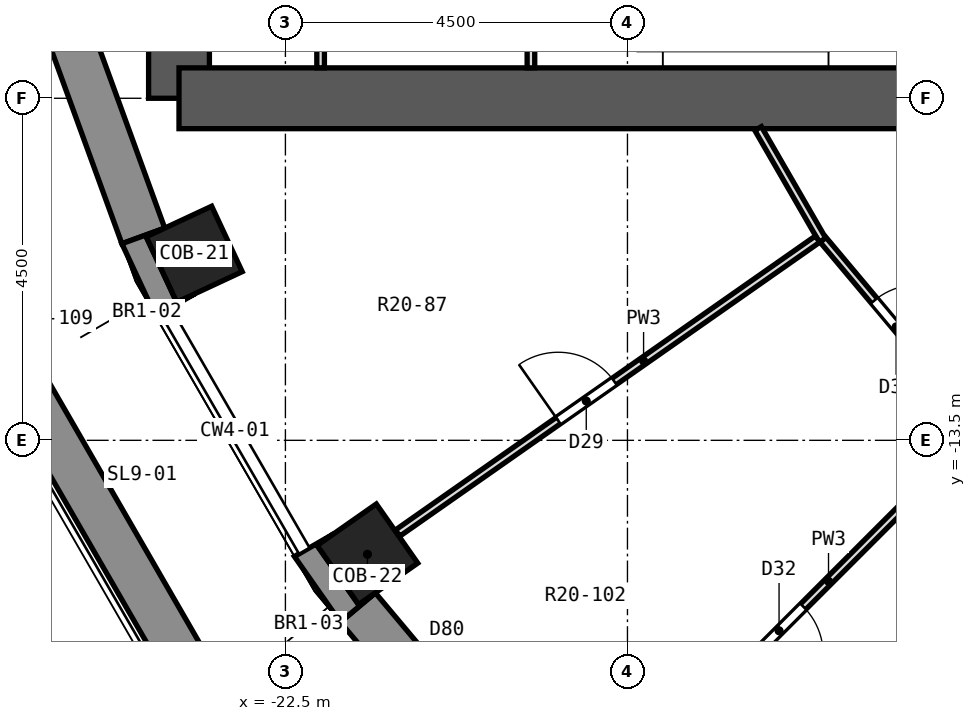
"""IFC4 building model, lengths in metres.
Left out: names, types, materials, properties, quantities, classifications, styles, units other than length and angle.
Written with IfcOpenShell. Run it as: python <this file> out.ifc"""

import sys

from ifc_helpers import new_model, si_unit, direction, frame, frame_2d, origin, origin_2d, place, context, subcontext, project, spatial, polyline, rectangle, outline, extrude, element, fill, save


model = new_model("IFC4")
c1 = context("Model", 3, precision=1e-05, world=origin(), true_north=direction((0.0, 1.0)))
c2 = subcontext(c1, "Body", "Model", "MODEL_VIEW")
j1 = project(units=[si_unit("LENGTHUNIT", "METRE"), si_unit("PLANEANGLEUNIT", "RADIAN")], contexts=[c1])
p1 = place(None, origin())
s1 = spatial("IfcSite", under=j1, at=p1, CompositionType="ELEMENT")
p2 = place(p1, origin())
s2 = spatial("IfcBuilding", under=s1, at=p2, CompositionType="ELEMENT")
p3 = place(p2, frame((0.0, 0.0, 121.6)))
s3 = spatial("IfcBuildingStorey", under=s2, at=p3, CompositionType="ELEMENT", Elevation=121.6)
for number, where, z_axis, x_axis in (
    (1, (-23.7, -11.052, 0.0), (0.0, 0.0, 1.0), (-0.906, -0.423, 0.0)),
    (2, (-21.421, -14.999, 0.0), (0.0, 0.0, 1.0), (-0.819, -0.574, 0.0)),
):
    element("IfcColumn", number, at=place(p3, frame(where, z_axis=z_axis, x_axis=x_axis)), inside=s3, PredefinedType="COLUMN", context=c2, shape_type="SweptSolid", body=[
        extrude(rectangle(XDim=0.95, YDim=0.95, at=origin_2d()), origin(), (0.0, 0.0, 1.0), 3.3),
    ])
p4 = place(p3, frame((-23.9, -9.0, 0.0), z_axis=(0.0, 0.0, 1.0), x_axis=(0.0, 1.0, 0.0)))
e3 = element("IfcWall", 3, at=p4, inside=s3, PredefinedType="SHEAR", context=c2, shape_type="SweptSolid", body=[
    extrude(rectangle(XDim=18.0, YDim=0.8, at=frame_2d((9.0, 0.0))), origin(), (0.0, 0.0, 1.0), 3.3),
])
p5 = place(p3, frame((-13.5, -9.0, 0.0), z_axis=(0.0, 0.0, 1.0), x_axis=(-1.0, 0.0, 0.0)))
e4 = element("IfcWall", 4, at=p5, inside=s3, PredefinedType="SHEAR", context=c2, shape_type="SweptSolid", body=[
    extrude(rectangle(XDim=10.4, YDim=0.8, at=frame_2d((5.2, 0.0))), origin(), (0.0, 0.0, 1.0), 3.3),
])
p6 = place(p3, frame((-25.617, -7.383, 0.0), z_axis=(0.0, 0.0, 1.0), x_axis=(0.341990236633, -0.939703505393, 0.0)))
e5 = element("IfcWall", 5, at=p6, inside=s3, PredefinedType="SOLIDWALL", context=c2, shape_type="SweptSolid", body=[
    extrude(rectangle(XDim=3.648, YDim=0.6, at=frame_2d((1.824, 0.0))), origin(), (0.0, 0.0, 1.0), 2.8),
])
p7 = place(p3, frame((-21.547, -15.699, 0.0), z_axis=(0.0, 0.0, 1.0), x_axis=(0.642774476932, -0.766055462616, 0.0)))
e6 = element("IfcWall", 6, at=p7, inside=s3, PredefinedType="SOLIDWALL", context=c2, shape_type="SweptSolid", body=[
    extrude(rectangle(XDim=3.648, YDim=0.6, at=frame_2d((1.824, 0.0))), origin(), (0.0, 0.0, 1.0), 2.8),
])
p8 = place(p7, frame((0.974, 0.0, 0.0)))
e7 = element("IfcOpeningElement", 7, at=p8, cuts=e6, PredefinedType="OPENING", context=c2, shape_type="SweptSolid", body=[
    extrude(rectangle(XDim=1.7, YDim=2.4, at=frame_2d((0.85, 1.2))), frame((0.0, 0.312, 0.0), z_axis=(0.0, -1.0, 0.0), x_axis=(1.0, 0.0, 0.0)), (0.0, 0.0, 1.0), 0.624),
])
p9 = place(p3, origin())
e8 = element("IfcWall", 8, at=p9, inside=s3, PredefinedType="SOLIDWALL", context=c2, shape_type="SweptSolid", body=[
    extrude(outline(polyline([(-24.651, -10.913), (-24.206, -11.869), (-23.686, -11.569), (-23.93, -11.683), (-24.331, -10.822), (-24.087, -10.708), (-24.651, -10.913)])), origin(), (0.0, 0.0, 1.0), 2.8),
])
p10 = place(p3, origin())
e9 = element("IfcWall", 9, at=p10, inside=s3, PredefinedType="SOLIDWALL", context=c2, shape_type="SweptSolid", body=[
    extrude(outline(polyline([(-21.777, -15.892), (-21.317, -15.506), (-21.538, -15.661), (-22.083, -14.882), (-21.862, -14.728), (-22.382, -15.028), (-21.777, -15.892)])), origin(), (0.0, 0.0, 1.0), 2.8),
])
p11 = place(p3, origin())
e10 = element("IfcWall", 10, at=p11, inside=s3, PredefinedType="PARAPET", context=c2, shape_type="SweptSolid", body=[
    extrude(outline(polyline([(-26.517, -12.365), (-23.967, -16.782), (-20.689, -20.689), (-20.263, -20.263), (-23.474, -16.437), (-25.971, -12.111), (-26.517, -12.365)])), origin(), (0.0, 0.0, 1.0), 0.5),
])
p12 = place(p3, frame((-16.281, -9.398, 0.0), z_axis=(0.0, 0.0, 1.0), x_axis=(0.499867730161, -0.866101756345, 0.0)))
e11 = element("IfcWall", 11, at=p12, inside=s3, PredefinedType="PARTITIONING", context=c2, shape_type="SweptSolid", body=[
    extrude(rectangle(XDim=1.697, YDim=0.1, at=frame_2d((0.849, 0.0))), origin(), (0.0, 0.0, 1.0), 2.8),
])
p13 = place(p3, frame((-15.426, -10.862, 0.0), z_axis=(0.0, 0.0, 1.0), x_axis=(0.642706409745, -0.766112570627, 0.0)))
e12 = element("IfcWall", 12, at=p13, inside=s3, PredefinedType="PARTITIONING", context=c2, shape_type="SweptSolid", body=[
    extrude(rectangle(XDim=3.29, YDim=0.1, at=frame_2d((1.645, 0.0))), origin(), (0.0, 0.0, 1.0), 2.8),
])
p14 = place(p13, frame((1.045, 0.0, 0.0)))
e13 = element("IfcOpeningElement", 13, at=p14, cuts=e12, PredefinedType="OPENING", context=c2, shape_type="SweptSolid", body=[
    extrude(rectangle(XDim=0.9, YDim=2.1, at=frame_2d((0.45, 1.05))), frame((0.0, 0.062, 0.0), z_axis=(0.0, -1.0, 0.0), x_axis=(1.0, 0.0, 0.0)), (0.0, 0.0, 1.0), 0.124),
])
p15 = place(p3, frame((-21.024, -14.72, 0.0), z_axis=(0.0, 0.0, 1.0), x_axis=(0.819214913262, 0.573486639678, 0.0)))
e14 = element("IfcWall", 14, at=p15, inside=s3, PredefinedType="PARTITIONING", context=c2, shape_type="SweptSolid", body=[
    extrude(rectangle(XDim=6.744, YDim=0.1, at=frame_2d((3.372, 0.0))), origin(), (0.0, 0.0, 1.0), 2.8),
])
p16 = place(p15, frame((2.58, 0.0, 0.0)))
e15 = element("IfcOpeningElement", 15, at=p16, cuts=e14, PredefinedType="OPENING", context=c2, shape_type="SweptSolid", body=[
    extrude(rectangle(XDim=0.9, YDim=2.1, at=frame_2d((0.45, 1.05))), frame((0.0, 0.062, 0.0), z_axis=(0.0, -1.0, 0.0), x_axis=(1.0, 0.0, 0.0)), (0.0, 0.0, 1.0), 0.124),
])
p17 = place(p3, frame((-18.148, -18.148, 0.0), z_axis=(0.0, 0.0, 1.0), x_axis=(0.707106781187, 0.707106781187, 0.0)))
e16 = element("IfcWall", 16, at=p17, inside=s3, PredefinedType="PARTITIONING", context=c2, shape_type="SweptSolid", body=[
    extrude(rectangle(XDim=6.744, YDim=0.1, at=frame_2d((3.372, 0.0))), origin(), (0.0, 0.0, 1.0), 2.8),
])
p18 = place(p17, frame((2.58, 0.0, 0.0)))
e17 = element("IfcOpeningElement", 17, at=p18, cuts=e16, PredefinedType="OPENING", context=c2, shape_type="SweptSolid", body=[
    extrude(rectangle(XDim=0.9, YDim=2.1, at=frame_2d((0.45, 1.05))), frame((0.0, 0.062, 0.0), z_axis=(0.0, -1.0, 0.0), x_axis=(1.0, 0.0, 0.0)), (0.0, 0.0, 1.0), 0.124),
])
for number, where, z_axis, x_axis in (
    (18, (-19.27, -8.6, 0.0), (0.0, 0.0, 1.0), (0.0, 1.0, 0.0)),
    (19, (-22.037, -8.6, 0.0), (0.0, 0.0, 1.0), (0.0, 1.0, 0.0)),
):
    element("IfcWall", number, at=place(p3, frame(where, z_axis=z_axis, x_axis=x_axis)), inside=s3, PredefinedType="PARTITIONING", context=c2, shape_type="SweptSolid", body=[
        extrude(rectangle(XDim=3.35, YDim=0.1, at=frame_2d((1.675, 0.0))), origin(), (0.0, 0.0, 1.0), 2.8),
    ])
p19 = place(p16, origin())
e20 = element("IfcDoor", 20, at=p19, inside=s3, OperationType="SINGLE_SWING_LEFT", PredefinedType="DOOR", context=c2, shape_type="SweptSolid", body=[
    extrude(rectangle(XDim=0.9, YDim=2.1, at=frame_2d((0.45, 1.05))), frame((0.0, 0.025, 0.0), z_axis=(0.0, -1.0, 0.0), x_axis=(1.0, 0.0, 0.0)), (0.0, 0.0, 1.0), 0.05),
])
fill(e15, e20)
p20 = place(p14, origin())
e21 = element("IfcDoor", 21, at=p20, inside=s3, OperationType="SINGLE_SWING_RIGHT", PredefinedType="DOOR", context=c2, shape_type="SweptSolid", body=[
    extrude(rectangle(XDim=0.9, YDim=2.1, at=frame_2d((0.45, 1.05))), frame((0.0, 0.025, 0.0), z_axis=(0.0, -1.0, 0.0), x_axis=(1.0, 0.0, 0.0)), (0.0, 0.0, 1.0), 0.05),
])
fill(e13, e21)
p21 = place(p18, frame((0.9, 0.0, 0.0), z_axis=(0.0, 0.0, 1.0), x_axis=(-1.0, 0.0, 0.0)))
e22 = element("IfcDoor", 22, at=p21, inside=s3, OperationType="SINGLE_SWING_RIGHT", PredefinedType="DOOR", context=c2, shape_type="SweptSolid", body=[
    extrude(rectangle(XDim=0.9, YDim=2.1, at=frame_2d((0.45, 1.05))), frame((0.0, 0.025, 0.0), z_axis=(0.0, -1.0, 0.0), x_axis=(1.0, 0.0, 0.0)), (0.0, 0.0, 1.0), 0.05),
])
fill(e17, e22)
save(model, sys.argv[1])
